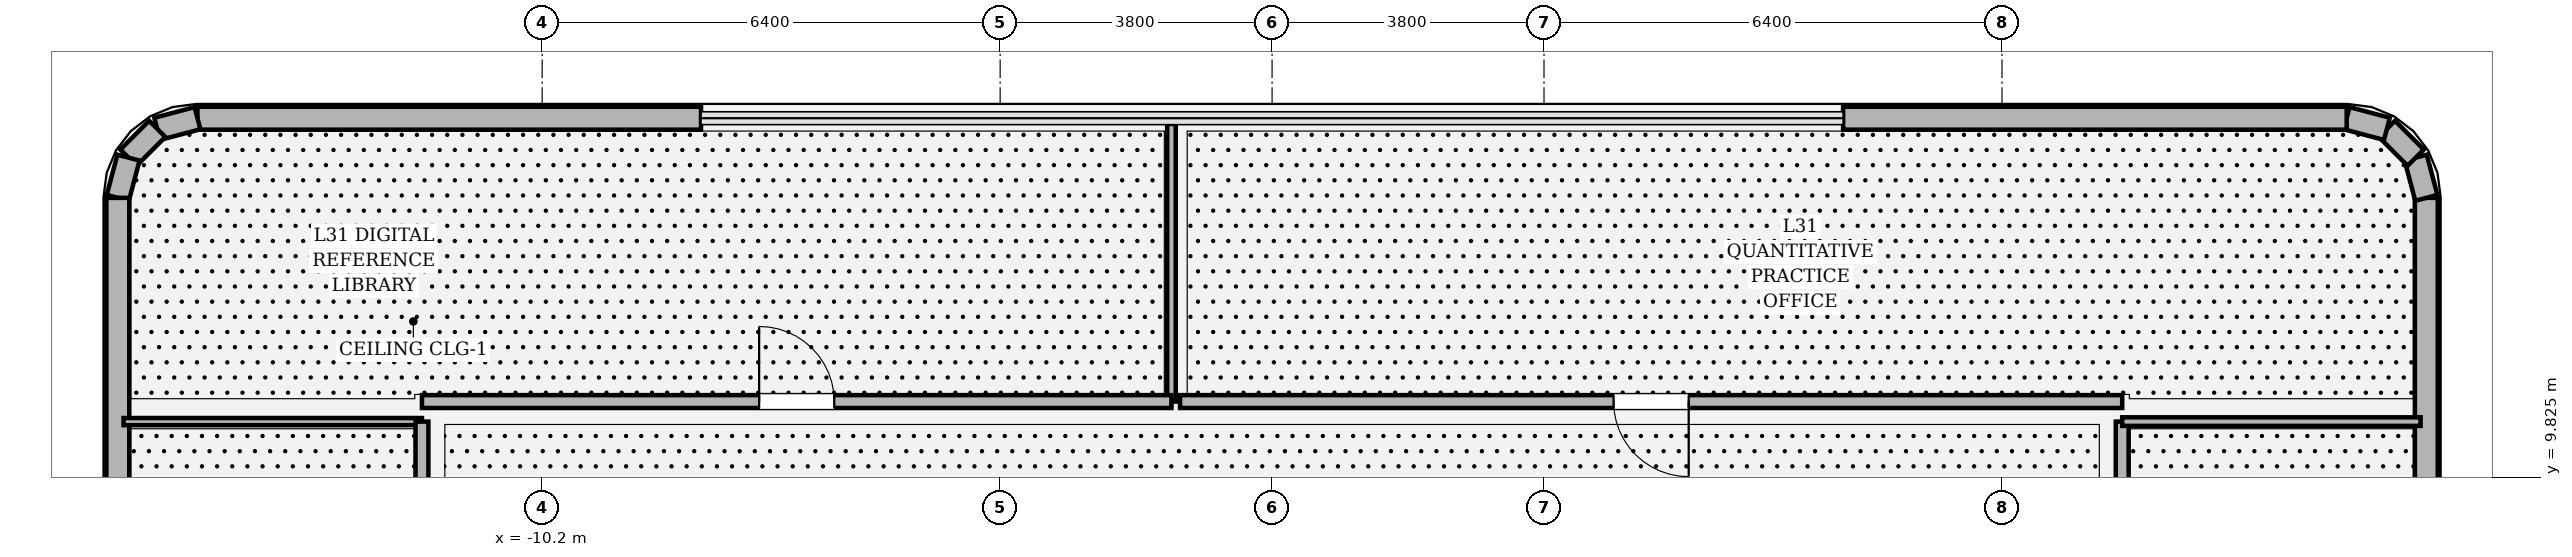
"""IFC4 building model, lengths in metres.
Left out: names, types, materials, properties, quantities, classifications, styles, units other than length and angle.
Written with IfcOpenShell. Run it as: python <this file> out.ifc"""

import sys

from ifc_helpers import new_model, si_unit, direction, frame, frame_2d, origin, place, context, subcontext, project, spatial, rectangle, extrude, element, fill, save


model = new_model("IFC4")
c1 = context("Model", 3, precision=1e-05, world=origin(), true_north=direction((0.0, 1.0)))
c2 = subcontext(c1, "Body", "Model", "MODEL_VIEW")
j1 = project(units=[si_unit("LENGTHUNIT", "METRE"), si_unit("PLANEANGLEUNIT", "RADIAN")], contexts=[c1])
p1 = place(None, origin())
s1 = spatial("IfcSite", under=j1, at=p1, CompositionType="ELEMENT")
p2 = place(p1, origin())
s2 = spatial("IfcBuilding", under=s1, at=p2, CompositionType="ELEMENT")
p3 = place(p2, frame((0.0, 0.0, 135.0)))
s3 = spatial("IfcBuildingStorey", under=s2, at=p3, CompositionType="ELEMENT", Elevation=135.0)
p4 = place(p3, frame((16.13, 6.69, 0.0), z_axis=(0.0, 0.0, 1.0), x_axis=(0.0, 1.0, 0.0)))
e1 = element("IfcWall", 1, at=p4, inside=s3, PredefinedType="SOLIDWALL", context=c2, shape_type="SweptSolid", body=[
    extrude(rectangle(XDim=7.037, YDim=0.32, at=frame_2d((3.519, 0.0))), origin(), (0.0, 0.0, 1.0), 3.194),
])
p5 = place(p3, frame((16.13, 13.727, 0.0), z_axis=(0.0, 0.0, 1.0), x_axis=(-0.255650250031, 0.966769336325, 0.0)))
e2 = element("IfcWall", 2, at=p5, inside=s3, PredefinedType="SOLIDWALL", context=c2, shape_type="SweptSolid", body=[
    extrude(rectangle(XDim=0.582, YDim=0.32, at=frame_2d((0.291, 0.0))), origin(), (0.0, 0.0, 1.0), 4.52),
])
p6 = place(p3, frame((15.981, 14.289, 0.0), z_axis=(0.0, 0.0, 1.0), x_axis=(-0.707106781187, 0.707106781187, 0.0)))
e3 = element("IfcWall", 3, at=p6, inside=s3, PredefinedType="SOLIDWALL", context=c2, shape_type="SweptSolid", body=[
    extrude(rectangle(XDim=0.569, YDim=0.32, at=frame_2d((0.284, 0.0))), origin(), (0.0, 0.0, 1.0), 4.52),
])
p7 = place(p3, frame((15.579, 14.691, 0.0), z_axis=(0.0, 0.0, 1.0), x_axis=(-0.966665515501, 0.256042537758, 0.0)))
e4 = element("IfcWall", 4, at=p7, inside=s3, PredefinedType="SOLIDWALL", context=c2, shape_type="SweptSolid", body=[
    extrude(rectangle(XDim=0.582, YDim=0.32, at=frame_2d((0.291, 0.0))), origin(), (0.0, 0.0, 1.0), 4.52),
])
for number, where, z_axis, x_axis in (
    (5, (15.017, 14.84, 0.0), (0.0, 0.0, 1.0), (-1.0, 0.0, 0.0)),
    (6, (-7.98, 14.84, 0.0), (0.0, 0.0, 1.0), (-1.0, 0.0, 0.0)),
):
    element("IfcWall", number, at=place(p3, frame(where, z_axis=z_axis, x_axis=x_axis)), inside=s3, PredefinedType="SOLIDWALL", context=c2, shape_type="SweptSolid", body=[
        extrude(rectangle(XDim=7.037, YDim=0.32, at=frame_2d((3.519, 0.0))), origin(), (0.0, 0.0, 1.0), 3.194),
    ])
p8 = place(p3, frame((-15.017, 14.84, 0.0), z_axis=(0.0, 0.0, 1.0), x_axis=(-0.966665515501, -0.256042537758, 0.0)))
e7 = element("IfcWall", 7, at=p8, inside=s3, PredefinedType="SOLIDWALL", context=c2, shape_type="SweptSolid", body=[
    extrude(rectangle(XDim=0.582, YDim=0.32, at=frame_2d((0.291, 0.0))), origin(), (0.0, 0.0, 1.0), 4.52),
])
p9 = place(p3, frame((-15.579, 14.691, 0.0), z_axis=(0.0, 0.0, 1.0), x_axis=(-0.707106781187, -0.707106781187, 0.0)))
e8 = element("IfcWall", 8, at=p9, inside=s3, PredefinedType="SOLIDWALL", context=c2, shape_type="SweptSolid", body=[
    extrude(rectangle(XDim=0.569, YDim=0.32, at=frame_2d((0.284, 0.0))), origin(), (0.0, 0.0, 1.0), 4.52),
])
p10 = place(p3, frame((-15.981, 14.289, 0.0), z_axis=(0.0, 0.0, 1.0), x_axis=(-0.255650250031, -0.966769336325, 0.0)))
e9 = element("IfcWall", 9, at=p10, inside=s3, PredefinedType="SOLIDWALL", context=c2, shape_type="SweptSolid", body=[
    extrude(rectangle(XDim=0.582, YDim=0.32, at=frame_2d((0.291, 0.0))), origin(), (0.0, 0.0, 1.0), 4.52),
])
p11 = place(p3, frame((-16.13, 13.727, 0.0), z_axis=(0.0, 0.0, 1.0), x_axis=(0.0, -1.0, 0.0)))
e10 = element("IfcWall", 10, at=p11, inside=s3, PredefinedType="SOLIDWALL", context=c2, shape_type="SweptSolid", body=[
    extrude(rectangle(XDim=7.037, YDim=0.32, at=frame_2d((3.519, 0.0))), origin(), (0.0, 0.0, 1.0), 3.194),
])
p12 = place(p3, frame((-16.05, 10.6, 0.0), z_axis=(0.0, 0.0, 1.0), x_axis=(1.0, 0.0, 0.0)))
e11 = element("IfcWall", 11, at=p12, inside=s3, PredefinedType="PARTITIONING", context=c2, shape_type="SweptSolid", body=[
    extrude(rectangle(XDim=4.17, YDim=0.1, at=frame_2d((2.085, 0.0))), origin(), (0.0, 0.0, 1.0), 4.114),
])
p13 = place(p3, frame((-11.88, 10.6, 0.0), z_axis=(0.0, 0.0, 1.0), x_axis=(0.0, -1.0, 0.0)))
e12 = element("IfcWall", 12, at=p13, inside=s3, PredefinedType="PARTITIONING", context=c2, shape_type="SweptSolid", body=[
    extrude(rectangle(XDim=10.54, YDim=0.18, at=frame_2d((5.27, 0.0))), origin(), (0.0, 0.0, 1.0), 3.194),
])
p14 = place(p13, frame((4.76, 0.0, 0.0)))
e13 = element("IfcOpeningElement", 13, at=p14, cuts=e12, PredefinedType="OPENING", context=c2, shape_type="SweptSolid", body=[
    extrude(rectangle(XDim=1.02, YDim=2.2, at=frame_2d((0.51, 1.1))), frame((0.0, 0.1, 0.0), z_axis=(0.0, -1.0, 0.0), x_axis=(1.0, 0.0, 0.0)), (0.0, 0.0, 1.0), 0.2),
])
p15 = place(p3, frame((11.88, 0.06, 0.0), z_axis=(0.0, 0.0, 1.0), x_axis=(0.0, 1.0, 0.0)))
e14 = element("IfcWall", 14, at=p15, inside=s3, PredefinedType="PARTITIONING", context=c2, shape_type="SweptSolid", body=[
    extrude(rectangle(XDim=10.54, YDim=0.18, at=frame_2d((5.27, 0.0))), origin(), (0.0, 0.0, 1.0), 3.194),
])
p16 = place(p15, frame((4.745, 0.0, 0.0)))
e15 = element("IfcOpeningElement", 15, at=p16, cuts=e14, PredefinedType="OPENING", context=c2, shape_type="SweptSolid", body=[
    extrude(rectangle(XDim=1.05, YDim=2.2, at=frame_2d((0.525, 1.1))), frame((0.0, 0.1, 0.0), z_axis=(0.0, -1.0, 0.0), x_axis=(1.0, 0.0, 0.0)), (0.0, 0.0, 1.0), 0.2),
])
p17 = place(p3, frame((11.88, 10.6, 0.0), z_axis=(0.0, 0.0, 1.0), x_axis=(1.0, 0.0, 0.0)))
e16 = element("IfcWall", 16, at=p17, inside=s3, PredefinedType="PARTITIONING", context=c2, shape_type="SweptSolid", body=[
    extrude(rectangle(XDim=4.17, YDim=0.12, at=frame_2d((2.085, 0.0))), origin(), (0.0, 0.0, 1.0), 4.114),
])
p18 = place(p3, frame((-1.406, 14.76, 0.0), z_axis=(0.0, 0.0, 1.0), x_axis=(0.0, -1.0, 0.0)))
e17 = element("IfcWall", 17, at=p18, inside=s3, PredefinedType="PARTITIONING", context=c2, shape_type="SweptSolid", body=[
    extrude(rectangle(XDim=3.88, YDim=0.12, at=frame_2d((1.94, 0.0))), origin(), (0.0, 0.0, 1.0), 4.52),
])
p19 = place(p3, frame((-1.406, 10.88, 0.0), z_axis=(0.0, 0.0, 1.0), x_axis=(-1.0, 0.0, 0.0)))
e18 = element("IfcWall", 18, at=p19, inside=s3, PredefinedType="PARTITIONING", context=c2, shape_type="SweptSolid", body=[
    extrude(rectangle(XDim=10.474, YDim=0.18, at=frame_2d((5.237, 0.0))), origin(), (0.0, 0.0, 1.0), 3.194),
])
p20 = place(p19, frame((4.712, 0.0, 0.0)))
e19 = element("IfcOpeningElement", 19, at=p20, cuts=e18, PredefinedType="OPENING", context=c2, shape_type="SweptSolid", body=[
    extrude(rectangle(XDim=1.05, YDim=2.2, at=frame_2d((0.525, 1.1))), frame((0.0, 0.1, 0.0), z_axis=(0.0, -1.0, 0.0), x_axis=(1.0, 0.0, 0.0)), (0.0, 0.0, 1.0), 0.2),
])
p21 = place(p3, frame((11.88, 10.88, 0.0), z_axis=(0.0, 0.0, 1.0), x_axis=(-1.0, 0.0, 0.0)))
e20 = element("IfcWall", 20, at=p21, inside=s3, PredefinedType="PARTITIONING", context=c2, shape_type="SweptSolid", body=[
    extrude(rectangle(XDim=13.166, YDim=0.18, at=frame_2d((6.583, 0.0))), origin(), (0.0, 0.0, 1.0), 3.194),
])
p22 = place(p21, frame((6.058, 0.0, 0.0)))
e21 = element("IfcOpeningElement", 21, at=p22, cuts=e20, PredefinedType="OPENING", context=c2, shape_type="SweptSolid", body=[
    extrude(rectangle(XDim=1.05, YDim=2.2, at=frame_2d((0.525, 1.1))), frame((0.0, 0.1, 0.0), z_axis=(0.0, -1.0, 0.0), x_axis=(1.0, 0.0, 0.0)), (0.0, 0.0, 1.0), 0.2),
])
p23 = place(p20, origin())
e22 = element("IfcDoor", 22, at=p23, inside=s3, OperationType="SINGLE_SWING_RIGHT", PredefinedType="DOOR", context=c2, shape_type="SweptSolid", body=[
    extrude(rectangle(XDim=1.05, YDim=2.2, at=frame_2d((0.525, 1.1))), frame((0.0, 0.025, 0.0), z_axis=(0.0, -1.0, 0.0), x_axis=(1.0, 0.0, 0.0)), (0.0, 0.0, 1.0), 0.05),
])
fill(e19, e22)
p24 = place(p22, origin())
e23 = element("IfcDoor", 23, at=p24, inside=s3, OperationType="SINGLE_SWING_LEFT", PredefinedType="DOOR", context=c2, shape_type="SweptSolid", body=[
    extrude(rectangle(XDim=1.05, YDim=2.2, at=frame_2d((0.525, 1.1))), frame((0.0, 0.025, 0.0), z_axis=(0.0, -1.0, 0.0), x_axis=(1.0, 0.0, 0.0)), (0.0, 0.0, 1.0), 0.05),
])
fill(e21, e23)
save(model, sys.argv[1])
